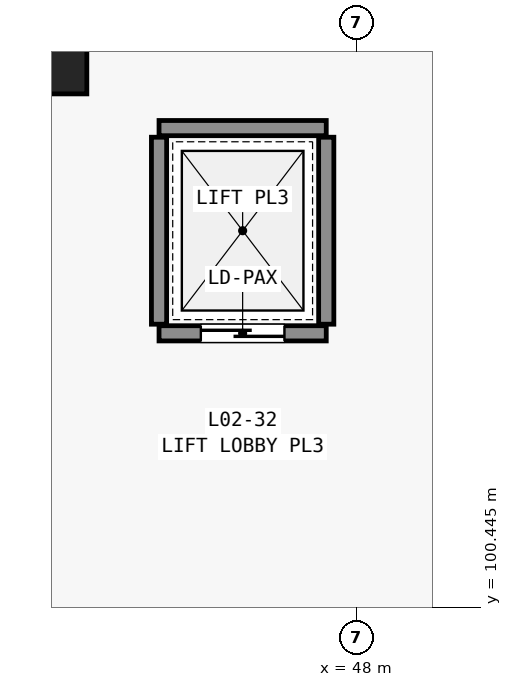
"""IFC4 building model, lengths in metres.
Left out: names, types, materials, properties, quantities, classifications, styles, units other than length and angle.
Written with IfcOpenShell. Run it as: python <this file> out.ifc"""

import sys

from ifc_helpers import new_model, si_unit, direction, frame, frame_2d, origin, origin_2d, place, context, subcontext, project, spatial, rectangle, extrude, element, fill, save


model = new_model("IFC4")
c1 = context("Model", 3, precision=1e-05, world=origin(), true_north=direction((0.0, 1.0)))
c2 = subcontext(c1, "Body", "Model", "MODEL_VIEW")
j1 = project(units=[si_unit("LENGTHUNIT", "METRE"), si_unit("PLANEANGLEUNIT", "RADIAN")], contexts=[c1])
p1 = place(None, origin())
s1 = spatial("IfcSite", under=j1, at=p1, CompositionType="ELEMENT")
p2 = place(p1, origin())
s2 = spatial("IfcBuilding", under=s1, at=p2, CompositionType="ELEMENT")
p3 = place(p2, frame((0.0, 0.0, 11.4)))
s3 = spatial("IfcBuildingStorey", under=s2, at=p3, CompositionType="ELEMENT", Elevation=11.4)
p4 = place(p3, frame((44.0, 107.8, 0.0), z_axis=(0.0, 0.0, 1.0), x_axis=(1.0, 0.0, 0.0)))
e1 = element("IfcColumn", 1, at=p4, inside=s3, PredefinedType="PILASTER", context=c2, shape_type="SweptSolid", body=[
    extrude(rectangle(XDim=0.9, YDim=1.2, at=origin_2d()), origin(), (0.0, 0.0, 1.0), 4.8),
])
p5 = place(p3, frame((45.4, 104.05, 0.0), z_axis=(0.0, 0.0, 1.0), x_axis=(1.0, 0.0, 0.0)))
e2 = element("IfcWall", 2, at=p5, inside=s3, PredefinedType="STANDARD", context=c2, shape_type="SweptSolid", body=[
    extrude(rectangle(XDim=2.2, YDim=0.2, at=frame_2d((1.1, 0.0))), origin(), (0.0, 0.0, 1.0), 4.45),
])
p6 = place(p5, frame((0.55, 0.0, 0.0)))
e3 = element("IfcOpeningElement", 3, at=p6, cuts=e2, PredefinedType="OPENING", context=c2, shape_type="SweptSolid", body=[
    extrude(rectangle(XDim=1.1, YDim=2.15, at=frame_2d((0.55, 1.075))), frame((0.0, 0.11, 0.0), z_axis=(0.0, -1.0, 0.0), x_axis=(1.0, 0.0, 0.0)), (0.0, 0.0, 1.0), 0.22),
])
p7 = place(p3, frame((45.4, 106.75, 0.0), z_axis=(0.0, 0.0, 1.0), x_axis=(1.0, 0.0, 0.0)))
e4 = element("IfcWall", 4, at=p7, inside=s3, PredefinedType="STANDARD", context=c2, shape_type="SweptSolid", body=[
    extrude(rectangle(XDim=2.2, YDim=0.2, at=frame_2d((1.1, 0.0))), origin(), (0.0, 0.0, 1.0), 4.45),
])
for number, where, z_axis, x_axis in (
    (5, (45.4, 104.17, 0.0), (0.0, 0.0, 1.0), (0.0, 1.0, 0.0)),
    (6, (47.6, 104.17, 0.0), (0.0, 0.0, 1.0), (0.0, 1.0, 0.0)),
):
    element("IfcWall", number, at=place(p3, frame(where, z_axis=z_axis, x_axis=x_axis)), inside=s3, PredefinedType="STANDARD", context=c2, shape_type="SweptSolid", body=[
        extrude(rectangle(XDim=2.46, YDim=0.2, at=frame_2d((1.23, 0.0))), origin(), (0.0, 0.0, 1.0), 4.45),
    ])
p8 = place(p6, origin())
e7 = element("IfcDoor", 7, at=p8, inside=s3, OperationType="SLIDING_TO_LEFT", PredefinedType="DOOR", context=c2, shape_type="SweptSolid", body=[
    extrude(rectangle(XDim=1.1, YDim=2.15, at=frame_2d((0.55, 1.075))), frame((0.0, 0.025, 0.0), z_axis=(0.0, -1.0, 0.0), x_axis=(1.0, 0.0, 0.0)), (0.0, 0.0, 1.0), 0.05),
])
fill(e3, e7)
save(model, sys.argv[1])
